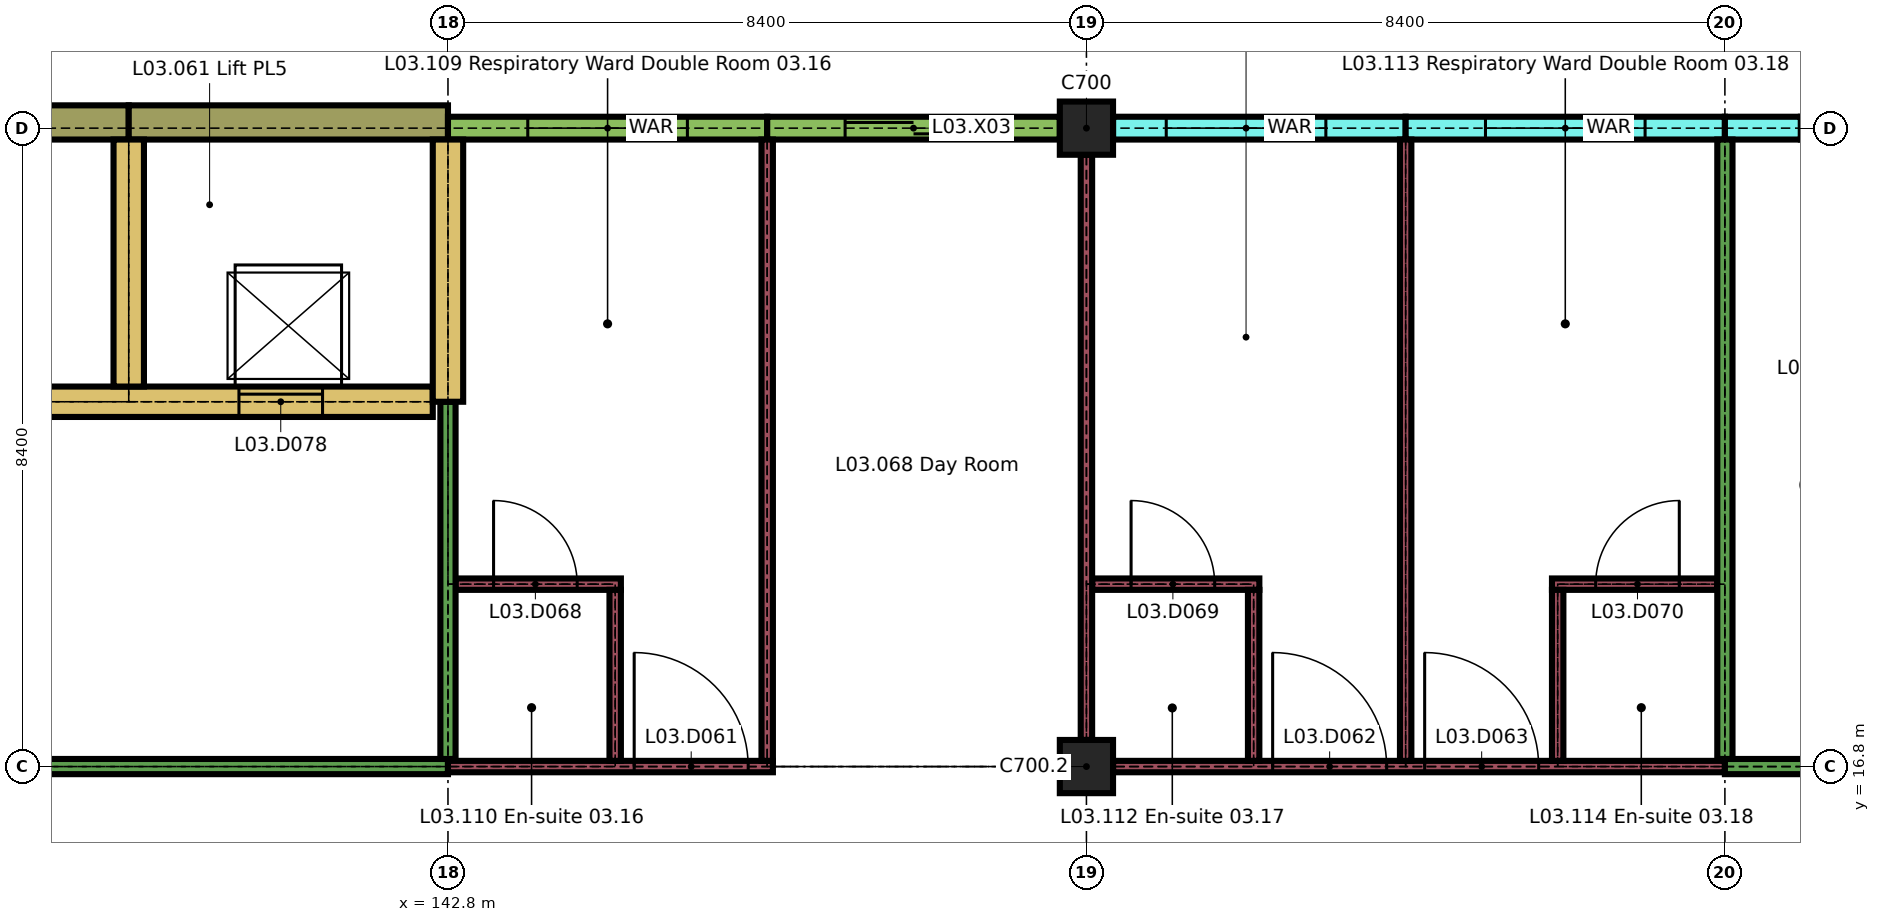
"""IFC4 building model, lengths in metres.
Left out: names, types, materials, properties, quantities, classifications, styles, units other than length and angle.
Written with IfcOpenShell. Run it as: python <this file> out.ifc"""

import sys

from ifc_helpers import new_model, si_unit, direction, frame, frame_2d, origin, origin_2d, place, context, subcontext, project, spatial, rectangle, extrude, element, fill, save


model = new_model("IFC4")
c1 = context("Model", 3, precision=1e-05, world=origin(), true_north=direction((0.0, 1.0)))
c2 = subcontext(c1, "Body", "Model", "MODEL_VIEW")
j1 = project(units=[si_unit("LENGTHUNIT", "METRE"), si_unit("PLANEANGLEUNIT", "RADIAN")], contexts=[c1])
p1 = place(None, origin())
s1 = spatial("IfcSite", under=j1, at=p1, CompositionType="ELEMENT")
p2 = place(p1, origin())
s2 = spatial("IfcBuilding", under=s1, at=p2, CompositionType="ELEMENT")
p3 = place(p2, frame((0.0, 0.0, 15.3)))
s3 = spatial("IfcBuildingStorey", under=s2, at=p3, CompositionType="ELEMENT", Elevation=15.3)
for number, where, z_axis, x_axis in (
    (1, (151.2, 16.8, 0.0), (0.0, 0.0, 1.0), (1.0, 0.0, 0.0)),
    (2, (151.2, 25.2, 0.0), (0.0, 0.0, 1.0), (1.0, 0.0, 0.0)),
):
    element("IfcColumn", number, at=place(p3, frame(where, z_axis=z_axis, x_axis=x_axis)), inside=s3, PredefinedType="COLUMN", context=c2, shape_type="SweptSolid", body=[
        extrude(rectangle(XDim=0.7, YDim=0.7, at=origin_2d()), origin(), (0.0, 0.0, 1.0), 3.26),
    ])
p4 = place(p3, frame((134.4, 25.275, 0.0), z_axis=(0.0, 0.0, 1.0), x_axis=(1.0, 0.0, 0.0)))
e3 = element("IfcWall", 3, at=p4, inside=s3, PredefinedType="SOLIDWALL", context=c2, shape_type="SweptSolid", body=[
    extrude(rectangle(XDim=4.2, YDim=0.45, at=frame_2d((2.1, 0.0))), origin(), (0.0, 0.0, 1.0), 3.26),
])
p5 = place(p3, frame((138.6, 25.275, 0.0), z_axis=(0.0, 0.0, 1.0), x_axis=(1.0, 0.0, 0.0)))
e4 = element("IfcWall", 4, at=p5, inside=s3, PredefinedType="SOLIDWALL", context=c2, shape_type="SweptSolid", body=[
    extrude(rectangle(XDim=4.2, YDim=0.45, at=frame_2d((2.1, 0.0))), origin(), (0.0, 0.0, 1.0), 3.26),
])
p6 = place(p3, frame((142.8, 25.2, 0.0), z_axis=(0.0, 0.0, 1.0), x_axis=(1.0, 0.0, 0.0)))
e5 = element("IfcWall", 5, at=p6, inside=s3, PredefinedType="SOLIDWALL", context=c2, shape_type="SweptSolid", body=[
    extrude(rectangle(XDim=4.2, YDim=0.3, at=frame_2d((2.1, 0.0))), origin(), (0.0, 0.0, 1.0), 2.96),
])
p7 = place(p6, frame((1.05, 0.0, 0.9)))
e6 = element("IfcOpeningElement", 6, at=p7, cuts=e5, PredefinedType="OPENING", context=c2, shape_type="SweptSolid", body=[
    extrude(rectangle(XDim=2.1, YDim=1.5, at=frame_2d((1.05, 0.75))), frame((0.0, 0.16, 0.0), z_axis=(0.0, -1.0, 0.0), x_axis=(1.0, 0.0, 0.0)), (0.0, 0.0, 1.0), 0.32),
])
p8 = place(p3, frame((147.0, 25.2, 0.0), z_axis=(0.0, 0.0, 1.0), x_axis=(1.0, 0.0, 0.0)))
e7 = element("IfcWall", 7, at=p8, inside=s3, PredefinedType="SOLIDWALL", context=c2, shape_type="SweptSolid", body=[
    extrude(rectangle(XDim=3.85, YDim=0.3, at=frame_2d((1.925, 0.0))), origin(), (0.0, 0.0, 1.0), 2.96),
])
p9 = place(p8, frame((1.025, 0.0, 0.0)))
e8 = element("IfcOpeningElement", 8, at=p9, cuts=e7, PredefinedType="OPENING", context=c2, shape_type="SweptSolid", body=[
    extrude(rectangle(XDim=1.8, YDim=2.4, at=frame_2d((0.9, 1.2))), frame((0.0, 0.16, 0.0), z_axis=(0.0, -1.0, 0.0), x_axis=(1.0, 0.0, 0.0)), (0.0, 0.0, 1.0), 0.32),
])
p10 = place(p3, frame((151.55, 25.2, 0.0), z_axis=(0.0, 0.0, 1.0), x_axis=(1.0, 0.0, 0.0)))
e9 = element("IfcWall", 9, at=p10, inside=s3, PredefinedType="SOLIDWALL", context=c2, shape_type="SweptSolid", body=[
    extrude(rectangle(XDim=3.85, YDim=0.3, at=frame_2d((1.925, 0.0))), origin(), (0.0, 0.0, 1.0), 3.26),
])
p11 = place(p10, frame((0.7, 0.0, 0.9)))
e10 = element("IfcOpeningElement", 10, at=p11, cuts=e9, PredefinedType="OPENING", context=c2, shape_type="SweptSolid", body=[
    extrude(rectangle(XDim=2.1, YDim=1.5, at=frame_2d((1.05, 0.75))), frame((0.0, 0.16, 0.0), z_axis=(0.0, -1.0, 0.0), x_axis=(1.0, 0.0, 0.0)), (0.0, 0.0, 1.0), 0.32),
])
p12 = place(p3, frame((155.4, 25.2, 0.0), z_axis=(0.0, 0.0, 1.0), x_axis=(1.0, 0.0, 0.0)))
e11 = element("IfcWall", 11, at=p12, inside=s3, PredefinedType="SOLIDWALL", context=c2, shape_type="SweptSolid", body=[
    extrude(rectangle(XDim=4.2, YDim=0.3, at=frame_2d((2.1, 0.0))), origin(), (0.0, 0.0, 1.0), 3.26),
])
p13 = place(p12, frame((1.05, 0.0, 0.9)))
e12 = element("IfcOpeningElement", 12, at=p13, cuts=e11, PredefinedType="OPENING", context=c2, shape_type="SweptSolid", body=[
    extrude(rectangle(XDim=2.1, YDim=1.5, at=frame_2d((1.05, 0.75))), frame((0.0, 0.16, 0.0), z_axis=(0.0, -1.0, 0.0), x_axis=(1.0, 0.0, 0.0)), (0.0, 0.0, 1.0), 0.32),
])
p14 = place(p3, frame((159.6, 25.2, 0.0), z_axis=(0.0, 0.0, 1.0), x_axis=(1.0, 0.0, 0.0)))
e13 = element("IfcWall", 13, at=p14, inside=s3, PredefinedType="SOLIDWALL", context=c2, shape_type="SweptSolid", body=[
    extrude(rectangle(XDim=1.0, YDim=0.3, at=frame_2d((0.5, 0.0))), origin(), (0.0, 0.0, 1.0), 3.26),
])
p15 = place(p3, frame((117.7, 16.8, 0.0), z_axis=(0.0, 0.0, 1.0), x_axis=(1.0, 0.0, 0.0)))
e14 = element("IfcWall", 14, at=p15, inside=s3, PredefinedType="PARTITIONING", context=c2, shape_type="SweptSolid", body=[
    extrude(rectangle(XDim=25.1, YDim=0.2, at=frame_2d((12.55, 0.0))), origin(), (0.0, 0.0, 1.0), 3.26),
])
p16 = place(p15, frame((3.3, 0.0, 0.0)))
e15 = element("IfcOpeningElement", 15, at=p16, cuts=e14, PredefinedType="OPENING", context=c2, shape_type="SweptSolid", body=[
    extrude(rectangle(XDim=1.7, YDim=2.4, at=frame_2d((0.85, 1.2))), frame((0.0, 0.11, 0.0), z_axis=(0.0, -1.0, 0.0), x_axis=(1.0, 0.0, 0.0)), (0.0, 0.0, 1.0), 0.22),
])
p17 = place(p15, frame((15.7, 0.0, 0.0)))
e16 = element("IfcOpeningElement", 16, at=p17, cuts=e14, PredefinedType="OPENING", context=c2, shape_type="SweptSolid", body=[
    extrude(rectangle(XDim=2.0, YDim=2.4, at=frame_2d((1.0, 1.2))), frame((0.0, 0.11, 0.0), z_axis=(0.0, -1.0, 0.0), x_axis=(1.0, 0.0, 0.0)), (0.0, 0.0, 1.0), 0.22),
])
p18 = place(p3, frame((142.8, 16.8, 0.0), z_axis=(0.0, 0.0, 1.0), x_axis=(1.0, 0.0, 0.0)))
e17 = element("IfcWall", 17, at=p18, inside=s3, PredefinedType="PARTITIONING", context=c2, shape_type="SweptSolid", body=[
    extrude(rectangle(XDim=4.275, YDim=0.15, at=frame_2d((2.137, 0.0))), origin(), (0.0, 0.0, 1.0), 3.26),
])
p19 = place(p18, frame((2.45, 0.0, 0.0)))
e18 = element("IfcOpeningElement", 18, at=p19, cuts=e17, PredefinedType="OPENING", context=c2, shape_type="SweptSolid", body=[
    extrude(rectangle(XDim=1.5, YDim=2.4, at=frame_2d((0.75, 1.2))), frame((0.0, 0.085, 0.0), z_axis=(0.0, -1.0, 0.0), x_axis=(1.0, 0.0, 0.0)), (0.0, 0.0, 1.0), 0.17),
])
p20 = place(p3, frame((151.55, 16.8, 0.0), z_axis=(0.0, 0.0, 1.0), x_axis=(1.0, 0.0, 0.0)))
e19 = element("IfcWall", 19, at=p20, inside=s3, PredefinedType="PARTITIONING", context=c2, shape_type="SweptSolid", body=[
    extrude(rectangle(XDim=8.05, YDim=0.15, at=frame_2d((4.025, 0.0))), origin(), (0.0, 0.0, 1.0), 3.26),
])
p21 = place(p20, frame((2.1, 0.0, 0.0)))
e20 = element("IfcOpeningElement", 20, at=p21, cuts=e19, PredefinedType="OPENING", context=c2, shape_type="SweptSolid", body=[
    extrude(rectangle(XDim=1.5, YDim=2.4, at=frame_2d((0.75, 1.2))), frame((0.0, 0.085, 0.0), z_axis=(0.0, -1.0, 0.0), x_axis=(1.0, 0.0, 0.0)), (0.0, 0.0, 1.0), 0.17),
])
p22 = place(p20, frame((4.1, 0.0, 0.0)))
e21 = element("IfcOpeningElement", 21, at=p22, cuts=e19, PredefinedType="OPENING", context=c2, shape_type="SweptSolid", body=[
    extrude(rectangle(XDim=1.5, YDim=2.4, at=frame_2d((0.75, 1.2))), frame((0.0, 0.085, 0.0), z_axis=(0.0, -1.0, 0.0), x_axis=(1.0, 0.0, 0.0)), (0.0, 0.0, 1.0), 0.17),
])
p23 = place(p3, frame((159.6, 16.8, 0.0), z_axis=(0.0, 0.0, 1.0), x_axis=(1.0, 0.0, 0.0)))
e22 = element("IfcWall", 22, at=p23, inside=s3, PredefinedType="PARTITIONING", context=c2, shape_type="SweptSolid", body=[
    extrude(rectangle(XDim=4.8, YDim=0.2, at=frame_2d((2.4, 0.0))), origin(), (0.0, 0.0, 1.0), 3.26),
])
p24 = place(p23, frame((1.4, 0.0, 0.0)))
e23 = element("IfcOpeningElement", 23, at=p24, cuts=e22, PredefinedType="OPENING", context=c2, shape_type="SweptSolid", body=[
    extrude(rectangle(XDim=2.0, YDim=2.4, at=frame_2d((1.0, 1.2))), frame((0.0, 0.11, 0.0), z_axis=(0.0, -1.0, 0.0), x_axis=(1.0, 0.0, 0.0)), (0.0, 0.0, 1.0), 0.22),
])
p25 = place(p3, frame((142.9, 19.2, 0.0), z_axis=(0.0, 0.0, 1.0), x_axis=(1.0, 0.0, 0.0)))
e24 = element("IfcWall", 24, at=p25, inside=s3, PredefinedType="PARTITIONING", context=c2, shape_type="SweptSolid", body=[
    extrude(rectangle(XDim=2.175, YDim=0.15, at=frame_2d((1.087, 0.0))), origin(), (0.0, 0.0, 1.0), 3.26),
])
p26 = place(p25, frame((0.5, 0.0, 0.0)))
e25 = element("IfcOpeningElement", 25, at=p26, cuts=e24, PredefinedType="OPENING", context=c2, shape_type="SweptSolid", body=[
    extrude(rectangle(XDim=1.1, YDim=2.1, at=frame_2d((0.55, 1.05))), frame((0.0, 0.085, 0.0), z_axis=(0.0, -1.0, 0.0), x_axis=(1.0, 0.0, 0.0)), (0.0, 0.0, 1.0), 0.17),
])
p27 = place(p3, frame((151.275, 19.2, 0.0), z_axis=(0.0, 0.0, 1.0), x_axis=(1.0, 0.0, 0.0)))
e26 = element("IfcWall", 26, at=p27, inside=s3, PredefinedType="PARTITIONING", context=c2, shape_type="SweptSolid", body=[
    extrude(rectangle(XDim=2.2, YDim=0.15, at=frame_2d((1.1, 0.0))), origin(), (0.0, 0.0, 1.0), 3.26),
])
p28 = place(p27, frame((0.512, 0.0, 0.0)))
e27 = element("IfcOpeningElement", 27, at=p28, cuts=e26, PredefinedType="OPENING", context=c2, shape_type="SweptSolid", body=[
    extrude(rectangle(XDim=1.1, YDim=2.1, at=frame_2d((0.55, 1.05))), frame((0.0, 0.085, 0.0), z_axis=(0.0, -1.0, 0.0), x_axis=(1.0, 0.0, 0.0)), (0.0, 0.0, 1.0), 0.17),
])
p29 = place(p3, frame((157.325, 19.2, 0.0), z_axis=(0.0, 0.0, 1.0), x_axis=(1.0, 0.0, 0.0)))
e28 = element("IfcWall", 28, at=p29, inside=s3, PredefinedType="PARTITIONING", context=c2, shape_type="SweptSolid", body=[
    extrude(rectangle(XDim=2.175, YDim=0.15, at=frame_2d((1.087, 0.0))), origin(), (0.0, 0.0, 1.0), 3.26),
])
p30 = place(p29, frame((0.575, 0.0, 0.0)))
e29 = element("IfcOpeningElement", 29, at=p30, cuts=e28, PredefinedType="OPENING", context=c2, shape_type="SweptSolid", body=[
    extrude(rectangle(XDim=1.1, YDim=2.1, at=frame_2d((0.55, 1.05))), frame((0.0, 0.085, 0.0), z_axis=(0.0, -1.0, 0.0), x_axis=(1.0, 0.0, 0.0)), (0.0, 0.0, 1.0), 0.17),
])
p31 = place(p3, frame((117.8, 21.6, 0.0), z_axis=(0.0, 0.0, 1.0), x_axis=(1.0, 0.0, 0.0)))
e30 = element("IfcWall", 30, at=p31, inside=s3, PredefinedType="SHEAR", context=c2, shape_type="SweptSolid", body=[
    extrude(rectangle(XDim=24.8, YDim=0.4, at=frame_2d((12.4, 0.0))), origin(), (0.0, 0.0, 1.0), 3.26),
])
p32 = place(p31, frame((1.35, 0.0, 0.0)))
e31 = element("IfcOpeningElement", 31, at=p32, cuts=e30, PredefinedType="OPENING", context=c2, shape_type="SweptSolid", body=[
    extrude(rectangle(XDim=1.3, YDim=2.1, at=frame_2d((0.65, 1.05))), frame((0.0, 0.21, 0.0), z_axis=(0.0, -1.0, 0.0), x_axis=(1.0, 0.0, 0.0)), (0.0, 0.0, 1.0), 0.42),
])
p33 = place(p31, frame((5.45, 0.0, 0.0)))
e32 = element("IfcOpeningElement", 32, at=p33, cuts=e30, PredefinedType="OPENING", context=c2, shape_type="SweptSolid", body=[
    extrude(rectangle(XDim=1.3, YDim=2.1, at=frame_2d((0.65, 1.05))), frame((0.0, 0.21, 0.0), z_axis=(0.0, -1.0, 0.0), x_axis=(1.0, 0.0, 0.0)), (0.0, 0.0, 1.0), 0.42),
])
p34 = place(p31, frame((9.65, 0.0, 0.0)))
e33 = element("IfcOpeningElement", 33, at=p34, cuts=e30, PredefinedType="OPENING", context=c2, shape_type="SweptSolid", body=[
    extrude(rectangle(XDim=1.3, YDim=2.1, at=frame_2d((0.65, 1.05))), frame((0.0, 0.21, 0.0), z_axis=(0.0, -1.0, 0.0), x_axis=(1.0, 0.0, 0.0)), (0.0, 0.0, 1.0), 0.42),
])
p35 = place(p31, frame((13.85, 0.0, 0.0)))
e34 = element("IfcOpeningElement", 34, at=p35, cuts=e30, PredefinedType="OPENING", context=c2, shape_type="SweptSolid", body=[
    extrude(rectangle(XDim=1.3, YDim=2.1, at=frame_2d((0.65, 1.05))), frame((0.0, 0.21, 0.0), z_axis=(0.0, -1.0, 0.0), x_axis=(1.0, 0.0, 0.0)), (0.0, 0.0, 1.0), 0.42),
])
p36 = place(p31, frame((18.15, 0.0, 0.0)))
e35 = element("IfcOpeningElement", 35, at=p36, cuts=e30, PredefinedType="OPENING", context=c2, shape_type="SweptSolid", body=[
    extrude(rectangle(XDim=1.1, YDim=2.1, at=frame_2d((0.55, 1.05))), frame((0.0, 0.21, 0.0), z_axis=(0.0, -1.0, 0.0), x_axis=(1.0, 0.0, 0.0)), (0.0, 0.0, 1.0), 0.42),
])
p37 = place(p31, frame((22.25, 0.0, 0.0)))
e36 = element("IfcOpeningElement", 36, at=p37, cuts=e30, PredefinedType="OPENING", context=c2, shape_type="SweptSolid", body=[
    extrude(rectangle(XDim=1.1, YDim=2.1, at=frame_2d((0.55, 1.05))), frame((0.0, 0.21, 0.0), z_axis=(0.0, -1.0, 0.0), x_axis=(1.0, 0.0, 0.0)), (0.0, 0.0, 1.0), 0.42),
])
p38 = place(p3, frame((138.6, 21.8, 0.0), z_axis=(0.0, 0.0, 1.0), x_axis=(0.0, 1.0, 0.0)))
e37 = element("IfcWall", 37, at=p38, inside=s3, PredefinedType="SHEAR", context=c2, shape_type="SweptSolid", body=[
    extrude(rectangle(XDim=3.25, YDim=0.4, at=frame_2d((1.625, 0.0))), origin(), (0.0, 0.0, 1.0), 3.26),
])
p39 = place(p3, frame((142.8, 16.9, 0.0), z_axis=(0.0, 0.0, 1.0), x_axis=(0.0, 1.0, 0.0)))
e38 = element("IfcWall", 38, at=p39, inside=s3, PredefinedType="PARTITIONING", context=c2, shape_type="SweptSolid", body=[
    extrude(rectangle(XDim=4.7, YDim=0.2, at=frame_2d((2.35, 0.0))), origin(), (0.0, 0.0, 1.0), 3.26),
])
p40 = place(p3, frame((142.8, 21.6, 0.0), z_axis=(0.0, 0.0, 1.0), x_axis=(0.0, 1.0, 0.0)))
e39 = element("IfcWall", 39, at=p40, inside=s3, PredefinedType="SHEAR", context=c2, shape_type="SweptSolid", body=[
    extrude(rectangle(XDim=3.45, YDim=0.4, at=frame_2d((1.725, 0.0))), origin(), (0.0, 0.0, 1.0), 3.26),
])
p41 = place(p3, frame((145.0, 16.875, 0.0), z_axis=(0.0, 0.0, 1.0), x_axis=(0.0, 1.0, 0.0)))
e40 = element("IfcWall", 40, at=p41, inside=s3, PredefinedType="PARTITIONING", context=c2, shape_type="SweptSolid", body=[
    extrude(rectangle(XDim=2.25, YDim=0.15, at=frame_2d((1.125, 0.0))), origin(), (0.0, 0.0, 1.0), 3.26),
])
p42 = place(p3, frame((147.0, 16.875, 0.0), z_axis=(0.0, 0.0, 1.0), x_axis=(0.0, 1.0, 0.0)))
e41 = element("IfcWall", 41, at=p42, inside=s3, PredefinedType="PARTITIONING", context=c2, shape_type="SweptSolid", body=[
    extrude(rectangle(XDim=8.175, YDim=0.15, at=frame_2d((4.087, 0.0))), origin(), (0.0, 0.0, 1.0), 3.26),
])
p43 = place(p3, frame((151.2, 17.15, 0.0), z_axis=(0.0, 0.0, 1.0), x_axis=(0.0, 1.0, 0.0)))
e42 = element("IfcWall", 42, at=p43, inside=s3, PredefinedType="PARTITIONING", context=c2, shape_type="SweptSolid", body=[
    extrude(rectangle(XDim=7.7, YDim=0.15, at=frame_2d((3.85, 0.0))), origin(), (0.0, 0.0, 1.0), 3.26),
])
p44 = place(p3, frame((153.4, 16.875, 0.0), z_axis=(0.0, 0.0, 1.0), x_axis=(0.0, 1.0, 0.0)))
e43 = element("IfcWall", 43, at=p44, inside=s3, PredefinedType="PARTITIONING", context=c2, shape_type="SweptSolid", body=[
    extrude(rectangle(XDim=2.25, YDim=0.15, at=frame_2d((1.125, 0.0))), origin(), (0.0, 0.0, 1.0), 3.26),
])
p45 = place(p3, frame((155.4, 16.875, 0.0), z_axis=(0.0, 0.0, 1.0), x_axis=(0.0, 1.0, 0.0)))
e44 = element("IfcWall", 44, at=p45, inside=s3, PredefinedType="PARTITIONING", context=c2, shape_type="SweptSolid", body=[
    extrude(rectangle(XDim=8.175, YDim=0.15, at=frame_2d((4.087, 0.0))), origin(), (0.0, 0.0, 1.0), 3.26),
])
p46 = place(p3, frame((157.4, 16.875, 0.0), z_axis=(0.0, 0.0, 1.0), x_axis=(0.0, 1.0, 0.0)))
e45 = element("IfcWall", 45, at=p46, inside=s3, PredefinedType="PARTITIONING", context=c2, shape_type="SweptSolid", body=[
    extrude(rectangle(XDim=2.25, YDim=0.15, at=frame_2d((1.125, 0.0))), origin(), (0.0, 0.0, 1.0), 3.26),
])
p47 = place(p3, frame((159.6, 16.9, 0.0), z_axis=(0.0, 0.0, 1.0), x_axis=(0.0, 1.0, 0.0)))
e46 = element("IfcWall", 46, at=p47, inside=s3, PredefinedType="PARTITIONING", context=c2, shape_type="SweptSolid", body=[
    extrude(rectangle(XDim=8.15, YDim=0.2, at=frame_2d((4.075, 0.0))), origin(), (0.0, 0.0, 1.0), 3.26),
])
p48 = place(p7, origin())
e47 = element("IfcWindow", 47, at=p48, inside=s3, PartitioningType="DOUBLE_PANEL_VERTICAL", PredefinedType="WINDOW", context=c2, shape_type="SweptSolid", body=[
    extrude(rectangle(XDim=2.1, YDim=1.5, at=frame_2d((1.05, 0.75))), frame((0.0, 0.05, 0.0), z_axis=(0.0, -1.0, 0.0), x_axis=(1.0, 0.0, 0.0)), (0.0, 0.0, 1.0), 0.1),
])
fill(e6, e47)
p49 = place(p9, origin())
e48 = element("IfcDoor", 48, at=p49, inside=s3, OperationType="DOUBLE_DOOR_SLIDING", PredefinedType="DOOR", context=c2, shape_type="SweptSolid", body=[
    extrude(rectangle(XDim=1.8, YDim=2.4, at=frame_2d((0.9, 1.2))), frame((0.0, 0.03, 0.0), z_axis=(0.0, -1.0, 0.0), x_axis=(1.0, 0.0, 0.0)), (0.0, 0.0, 1.0), 0.06),
])
fill(e8, e48)
p50 = place(p11, origin())
e49 = element("IfcWindow", 49, at=p50, inside=s3, PartitioningType="DOUBLE_PANEL_VERTICAL", PredefinedType="WINDOW", context=c2, shape_type="SweptSolid", body=[
    extrude(rectangle(XDim=2.1, YDim=1.5, at=frame_2d((1.05, 0.75))), frame((0.0, 0.05, 0.0), z_axis=(0.0, -1.0, 0.0), x_axis=(1.0, 0.0, 0.0)), (0.0, 0.0, 1.0), 0.1),
])
fill(e10, e49)
p51 = place(p13, origin())
e50 = element("IfcWindow", 50, at=p51, inside=s3, PartitioningType="DOUBLE_PANEL_VERTICAL", PredefinedType="WINDOW", context=c2, shape_type="SweptSolid", body=[
    extrude(rectangle(XDim=2.1, YDim=1.5, at=frame_2d((1.05, 0.75))), frame((0.0, 0.05, 0.0), z_axis=(0.0, -1.0, 0.0), x_axis=(1.0, 0.0, 0.0)), (0.0, 0.0, 1.0), 0.1),
])
fill(e12, e50)
p52 = place(p19, origin())
e51 = element("IfcDoor", 51, at=p52, inside=s3, OperationType="SINGLE_SWING_RIGHT", PredefinedType="DOOR", context=c2, shape_type="SweptSolid", body=[
    extrude(rectangle(XDim=1.5, YDim=2.4, at=frame_2d((0.75, 1.2))), frame((0.0, 0.03, 0.0), z_axis=(0.0, -1.0, 0.0), x_axis=(1.0, 0.0, 0.0)), (0.0, 0.0, 1.0), 0.06),
])
fill(e18, e51)
p53 = place(p21, origin())
e52 = element("IfcDoor", 52, at=p53, inside=s3, OperationType="SINGLE_SWING_RIGHT", PredefinedType="DOOR", context=c2, shape_type="SweptSolid", body=[
    extrude(rectangle(XDim=1.5, YDim=2.4, at=frame_2d((0.75, 1.2))), frame((0.0, 0.03, 0.0), z_axis=(0.0, -1.0, 0.0), x_axis=(1.0, 0.0, 0.0)), (0.0, 0.0, 1.0), 0.06),
])
fill(e20, e52)
p54 = place(p22, origin())
e53 = element("IfcDoor", 53, at=p54, inside=s3, OperationType="SINGLE_SWING_RIGHT", PredefinedType="DOOR", context=c2, shape_type="SweptSolid", body=[
    extrude(rectangle(XDim=1.5, YDim=2.4, at=frame_2d((0.75, 1.2))), frame((0.0, 0.03, 0.0), z_axis=(0.0, -1.0, 0.0), x_axis=(1.0, 0.0, 0.0)), (0.0, 0.0, 1.0), 0.06),
])
fill(e21, e53)
p55 = place(p26, origin())
e54 = element("IfcDoor", 54, at=p55, inside=s3, OperationType="SINGLE_SWING_RIGHT", PredefinedType="DOOR", context=c2, shape_type="SweptSolid", body=[
    extrude(rectangle(XDim=1.1, YDim=2.1, at=frame_2d((0.55, 1.05))), frame((0.0, 0.025, 0.0), z_axis=(0.0, -1.0, 0.0), x_axis=(1.0, 0.0, 0.0)), (0.0, 0.0, 1.0), 0.05),
])
fill(e25, e54)
p56 = place(p28, origin())
e55 = element("IfcDoor", 55, at=p56, inside=s3, OperationType="SINGLE_SWING_RIGHT", PredefinedType="DOOR", context=c2, shape_type="SweptSolid", body=[
    extrude(rectangle(XDim=1.1, YDim=2.1, at=frame_2d((0.55, 1.05))), frame((0.0, 0.025, 0.0), z_axis=(0.0, -1.0, 0.0), x_axis=(1.0, 0.0, 0.0)), (0.0, 0.0, 1.0), 0.05),
])
fill(e27, e55)
p57 = place(p30, origin())
e56 = element("IfcDoor", 56, at=p57, inside=s3, OperationType="SINGLE_SWING_LEFT", PredefinedType="DOOR", context=c2, shape_type="SweptSolid", body=[
    extrude(rectangle(XDim=1.1, YDim=2.1, at=frame_2d((0.55, 1.05))), frame((0.0, 0.025, 0.0), z_axis=(0.0, -1.0, 0.0), x_axis=(1.0, 0.0, 0.0)), (0.0, 0.0, 1.0), 0.05),
])
fill(e29, e56)
p58 = place(p37, origin())
e57 = element("IfcDoor", 57, at=p58, inside=s3, OperationType="SLIDING_TO_LEFT", PredefinedType="DOOR", context=c2, shape_type="SweptSolid", body=[
    extrude(rectangle(XDim=1.1, YDim=2.1, at=frame_2d((0.55, 1.05))), frame((0.0, 0.025, 0.0), z_axis=(0.0, -1.0, 0.0), x_axis=(1.0, 0.0, 0.0)), (0.0, 0.0, 1.0), 0.05),
])
fill(e36, e57)
save(model, sys.argv[1])
